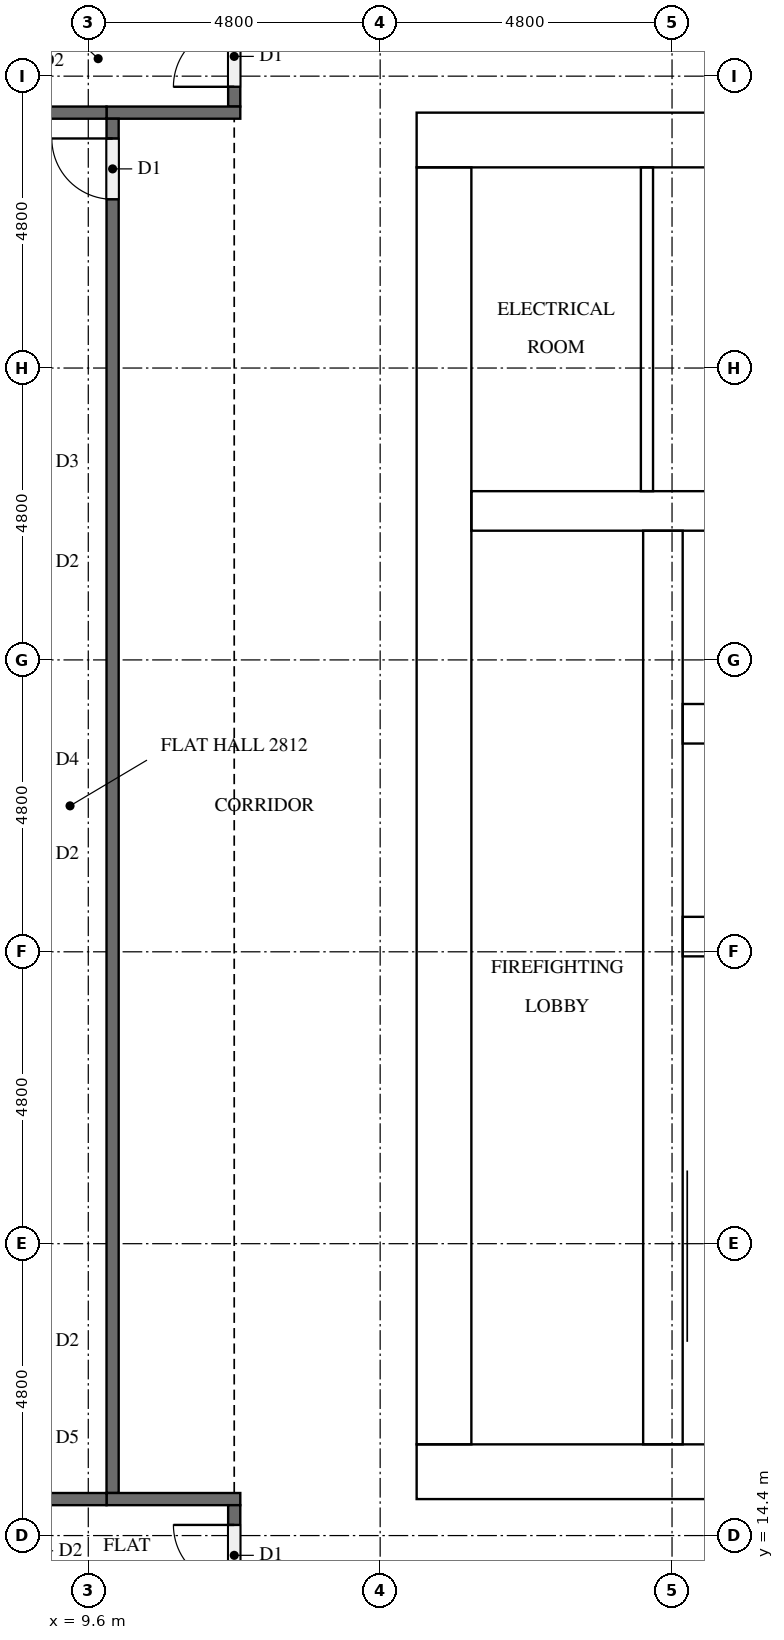
"""IFC4 building model, lengths in metres.
Left out: names, types, materials, properties, quantities, classifications, styles, units other than length and angle.
Written with IfcOpenShell. Run it as: python <this file> out.ifc"""

import sys

from ifc_helpers import new_model, si_unit, direction, frame, frame_2d, origin, place, context, subcontext, project, spatial, rectangle, extrude, element, fill, save


model = new_model("IFC4")
c1 = context("Model", 3, precision=1e-05, world=origin(), true_north=direction((0.0, 1.0)))
c2 = subcontext(c1, "Body", "Model", "MODEL_VIEW")
j1 = project(units=[si_unit("LENGTHUNIT", "METRE"), si_unit("PLANEANGLEUNIT", "RADIAN")], contexts=[c1])
p1 = place(None, origin())
s1 = spatial("IfcSite", under=j1, at=p1, CompositionType="ELEMENT")
p2 = place(p1, origin())
s2 = spatial("IfcBuilding", under=s1, at=p2, CompositionType="ELEMENT")
p3 = place(p2, frame((0.0, 0.0, 110.2)))
s3 = spatial("IfcBuildingStorey", under=s2, at=p3, CompositionType="ELEMENT", Elevation=110.2)
p4 = place(p3, frame((15.0, 15.45, 0.0), z_axis=(0.0, 0.0, 1.0), x_axis=(1.0, 0.0, 0.0)))
e1 = element("IfcWall", 1, at=p4, inside=s3, PredefinedType="SHEAR", context=c2, shape_type="SweptSolid", body=[
    extrude(rectangle(XDim=32.4, YDim=0.9, at=frame_2d((16.2, 0.0))), origin(), (0.0, 0.0, 1.0), 3.1),
])
p5 = place(p4, frame((15.3, 0.0, 0.0)))
e2 = element("IfcOpeningElement", 2, at=p5, cuts=e1, PredefinedType="OPENING", context=c2, shape_type="SweptSolid", body=[
    extrude(rectangle(XDim=1.8, YDim=2.1, at=frame_2d((0.9, 1.05))), frame((0.0, 0.46, 0.0), z_axis=(0.0, -1.0, 0.0), x_axis=(1.0, 0.0, 0.0)), (0.0, 0.0, 1.0), 0.92),
])
p6 = place(p3, frame((15.0, 37.35, 0.0), z_axis=(0.0, 0.0, 1.0), x_axis=(1.0, 0.0, 0.0)))
e3 = element("IfcWall", 3, at=p6, inside=s3, PredefinedType="SHEAR", context=c2, shape_type="SweptSolid", body=[
    extrude(rectangle(XDim=32.4, YDim=0.9, at=frame_2d((16.2, 0.0))), origin(), (0.0, 0.0, 1.0), 3.1),
])
p7 = place(p6, frame((15.3, 0.0, 0.0)))
e4 = element("IfcOpeningElement", 4, at=p7, cuts=e3, PredefinedType="OPENING", context=c2, shape_type="SweptSolid", body=[
    extrude(rectangle(XDim=1.8, YDim=2.1, at=frame_2d((0.9, 1.05))), frame((0.0, 0.46, 0.0), z_axis=(0.0, -1.0, 0.0), x_axis=(1.0, 0.0, 0.0)), (0.0, 0.0, 1.0), 0.92),
])
p8 = place(p6, frame((1.794, 0.0, 0.0)))
e5 = element("IfcOpeningElement", 5, at=p8, cuts=e3, PredefinedType="OPENING", context=c2, shape_type="SweptSolid", body=[
    extrude(rectangle(XDim=1.0, YDim=2.1, at=frame_2d((0.5, 1.05))), frame((0.0, 0.46, 0.0), z_axis=(0.0, -1.0, 0.0), x_axis=(1.0, 0.0, 0.0)), (0.0, 0.0, 1.0), 0.92),
])
p9 = place(p6, frame((5.331, 0.0, 0.0)))
e6 = element("IfcOpeningElement", 6, at=p9, cuts=e3, PredefinedType="OPENING", context=c2, shape_type="SweptSolid", body=[
    extrude(rectangle(XDim=1.0, YDim=2.1, at=frame_2d((0.5, 1.05))), frame((0.0, 0.46, 0.0), z_axis=(0.0, -1.0, 0.0), x_axis=(1.0, 0.0, 0.0)), (0.0, 0.0, 1.0), 0.92),
])
p10 = place(p3, frame((15.45, 15.9, 0.0), z_axis=(0.0, 0.0, 1.0), x_axis=(0.0, 1.0, 0.0)))
e7 = element("IfcWall", 7, at=p10, inside=s3, PredefinedType="SHEAR", context=c2, shape_type="SweptSolid", body=[
    extrude(rectangle(XDim=21.0, YDim=0.9, at=frame_2d((10.5, 0.0))), origin(), (0.0, 0.0, 1.0), 3.1),
])
p11 = place(p10, frame((4.86, 0.0, 0.0)))
e8 = element("IfcOpeningElement", 8, at=p11, cuts=e7, PredefinedType="OPENING", context=c2, shape_type="SweptSolid", body=[
    extrude(rectangle(XDim=1.2, YDim=2.1, at=frame_2d((0.6, 1.05))), frame((0.0, 0.46, 0.0), z_axis=(0.0, -1.0, 0.0), x_axis=(1.0, 0.0, 0.0)), (0.0, 0.0, 1.0), 0.92),
])
p12 = place(p3, frame((19.05, 15.9, 0.0), z_axis=(0.0, 0.0, 1.0), x_axis=(0.0, 1.0, 0.0)))
e9 = element("IfcWall", 9, at=p12, inside=s3, PredefinedType="SHEAR", context=c2, shape_type="SweptSolid", body=[
    extrude(rectangle(XDim=15.025, YDim=0.65, at=frame_2d((7.513, 0.0))), origin(), (0.0, 0.0, 1.0), 3.1),
])
p13 = place(p12, frame((9.55, 0.0, 0.0)))
e10 = element("IfcOpeningElement", 10, at=p13, cuts=e9, PredefinedType="OPENING", context=c2, shape_type="SweptSolid", body=[
    extrude(rectangle(XDim=1.1, YDim=2.1, at=frame_2d((0.55, 1.05))), frame((0.0, 0.335, 0.0), z_axis=(0.0, -1.0, 0.0), x_axis=(1.0, 0.0, 0.0)), (0.0, 0.0, 1.0), 0.67),
])
p14 = place(p12, frame((13.05, 0.0, 0.0)))
e11 = element("IfcOpeningElement", 11, at=p14, cuts=e9, PredefinedType="OPENING", context=c2, shape_type="SweptSolid", body=[
    extrude(rectangle(XDim=1.1, YDim=2.1, at=frame_2d((0.55, 1.05))), frame((0.0, 0.335, 0.0), z_axis=(0.0, -1.0, 0.0), x_axis=(1.0, 0.0, 0.0)), (0.0, 0.0, 1.0), 0.67),
])
p15 = place(p12, frame((0.3, 0.0, 0.0)))
e12 = element("IfcOpeningElement", 12, at=p15, cuts=e9, PredefinedType="OPENING", context=c2, shape_type="SweptSolid", body=[
    extrude(rectangle(XDim=1.2, YDim=2.1, at=frame_2d((0.6, 1.05))), frame((0.0, 0.335, 0.0), z_axis=(0.0, -1.0, 0.0), x_axis=(1.0, 0.0, 0.0)), (0.0, 0.0, 1.0), 0.67),
])
for number, where, z_axis, x_axis in (
    (13, (19.375, 24.25, 0.0), (0.0, 0.0, 1.0), (1.0, 0.0, 0.0)),
    (14, (19.375, 27.75, 0.0), (0.0, 0.0, 1.0), (1.0, 0.0, 0.0)),
):
    element("IfcWall", number, at=place(p3, frame(where, z_axis=z_axis, x_axis=x_axis)), inside=s3, PredefinedType="SHEAR", context=c2, shape_type="SweptSolid", body=[
        extrude(rectangle(XDim=3.4, YDim=0.65, at=frame_2d((1.7, 0.0))), origin(), (0.0, 0.0, 1.0), 3.1),
    ])
p16 = place(p3, frame((15.9, 31.25, 0.0), z_axis=(0.0, 0.0, 1.0), x_axis=(1.0, 0.0, 0.0)))
e15 = element("IfcWall", 15, at=p16, inside=s3, PredefinedType="SHEAR", context=c2, shape_type="SweptSolid", body=[
    extrude(rectangle(XDim=6.875, YDim=0.65, at=frame_2d((3.438, 0.0))), origin(), (0.0, 0.0, 1.0), 3.1),
])
p17 = place(p3, frame((18.788, 31.575, 0.0), z_axis=(0.0, 0.0, 1.0), x_axis=(0.0, 1.0, 0.0)))
e16 = element("IfcWall", 16, at=p17, inside=s3, PredefinedType="PARTITIONING", context=c2, shape_type="SweptSolid", body=[
    extrude(rectangle(XDim=5.325, YDim=0.2, at=frame_2d((2.663, 0.0))), origin(), (0.0, 0.0, 1.0), 3.1),
])
p18 = place(p3, frame((12.0, 37.9, 0.0), z_axis=(0.0, 0.0, 1.0), x_axis=(0.0, 1.0, 0.0)))
e17 = element("IfcWall", 17, at=p18, inside=s3, PredefinedType="PARTITIONING", context=c2, shape_type="SweptSolid", body=[
    extrude(rectangle(XDim=2.8, YDim=0.2, at=frame_2d((1.4, 0.0))), origin(), (0.0, 0.0, 1.0), 3.1),
])
p19 = place(p18, frame((0.325, 0.0, 0.0)))
e18 = element("IfcOpeningElement", 18, at=p19, cuts=e17, PredefinedType="OPENING", context=c2, shape_type="SweptSolid", body=[
    extrude(rectangle(XDim=1.0, YDim=2.1, at=frame_2d((0.5, 1.05))), frame((0.0, 0.11, 0.0), z_axis=(0.0, -1.0, 0.0), x_axis=(1.0, 0.0, 0.0)), (0.0, 0.0, 1.0), 0.22),
])
p20 = place(p3, frame((12.1, 37.8, 0.0), z_axis=(0.0, 0.0, 1.0), x_axis=(-1.0, 0.0, 0.0)))
e19 = element("IfcWall", 19, at=p20, inside=s3, PredefinedType="PARTITIONING", context=c2, shape_type="SweptSolid", body=[
    extrude(rectangle(XDim=2.2, YDim=0.2, at=frame_2d((1.1, 0.0))), origin(), (0.0, 0.0, 1.0), 3.1),
])
p21 = place(p3, frame((10.0, 15.1, 0.0), z_axis=(0.0, 0.0, 1.0), x_axis=(0.0, 1.0, 0.0)))
e20 = element("IfcWall", 20, at=p21, inside=s3, PredefinedType="PARTITIONING", context=c2, shape_type="SweptSolid", body=[
    extrude(rectangle(XDim=22.6, YDim=0.2, at=frame_2d((11.3, 0.0))), origin(), (0.0, 0.0, 1.0), 3.1),
])
p22 = place(p21, frame((21.275, 0.0, 0.0)))
e21 = element("IfcOpeningElement", 21, at=p22, cuts=e20, PredefinedType="OPENING", context=c2, shape_type="SweptSolid", body=[
    extrude(rectangle(XDim=1.0, YDim=2.1, at=frame_2d((0.5, 1.05))), frame((0.0, 0.11, 0.0), z_axis=(0.0, -1.0, 0.0), x_axis=(1.0, 0.0, 0.0)), (0.0, 0.0, 1.0), 0.22),
])
p23 = place(p3, frame((9.9, 15.0, 0.0), z_axis=(0.0, 0.0, 1.0), x_axis=(1.0, 0.0, 0.0)))
e22 = element("IfcWall", 22, at=p23, inside=s3, PredefinedType="PARTITIONING", context=c2, shape_type="SweptSolid", body=[
    extrude(rectangle(XDim=2.2, YDim=0.2, at=frame_2d((1.1, 0.0))), origin(), (0.0, 0.0, 1.0), 3.1),
])
p24 = place(p3, frame((12.0, 12.1, 0.0), z_axis=(0.0, 0.0, 1.0), x_axis=(0.0, 1.0, 0.0)))
e23 = element("IfcWall", 23, at=p24, inside=s3, PredefinedType="PARTITIONING", context=c2, shape_type="SweptSolid", body=[
    extrude(rectangle(XDim=2.8, YDim=0.2, at=frame_2d((1.4, 0.0))), origin(), (0.0, 0.0, 1.0), 3.1),
])
p25 = place(p24, frame((1.475, 0.0, 0.0)))
e24 = element("IfcOpeningElement", 24, at=p25, cuts=e23, PredefinedType="OPENING", context=c2, shape_type="SweptSolid", body=[
    extrude(rectangle(XDim=1.0, YDim=2.1, at=frame_2d((0.5, 1.05))), frame((0.0, 0.11, 0.0), z_axis=(0.0, -1.0, 0.0), x_axis=(1.0, 0.0, 0.0)), (0.0, 0.0, 1.0), 0.22),
])
p26 = place(p3, frame((5.225, 37.8, 0.0), z_axis=(0.0, 0.0, 1.0), x_axis=(1.0, 0.0, 0.0)))
e25 = element("IfcWall", 25, at=p26, inside=s3, PredefinedType="PARTITIONING", context=c2, shape_type="SweptSolid", body=[
    extrude(rectangle(XDim=4.675, YDim=0.2, at=frame_2d((2.337, 0.0))), origin(), (0.0, 0.0, 1.0), 3.1),
])
p27 = place(p3, frame((4.9, 15.0, 0.0), z_axis=(0.0, 0.0, 1.0), x_axis=(1.0, 0.0, 0.0)))
e26 = element("IfcWall", 26, at=p27, inside=s3, PredefinedType="PARTITIONING", context=c2, shape_type="SweptSolid", body=[
    extrude(rectangle(XDim=5.0, YDim=0.2, at=frame_2d((2.5, 0.0))), origin(), (0.0, 0.0, 1.0), 3.1),
])
p28 = place(p13, origin())
e27 = element("IfcDoor", 27, at=p28, inside=s3, OperationType="DOUBLE_DOOR_SLIDING", PredefinedType="DOOR", context=c2, shape_type="SweptSolid", body=[
    extrude(rectangle(XDim=1.1, YDim=2.1, at=frame_2d((0.55, 1.05))), frame((0.0, 0.025, 0.0), z_axis=(0.0, -1.0, 0.0), x_axis=(1.0, 0.0, 0.0)), (0.0, 0.0, 1.0), 0.05),
])
fill(e10, e27)
p29 = place(p14, origin())
e28 = element("IfcDoor", 28, at=p29, inside=s3, OperationType="DOUBLE_DOOR_SLIDING", PredefinedType="DOOR", context=c2, shape_type="SweptSolid", body=[
    extrude(rectangle(XDim=1.1, YDim=2.1, at=frame_2d((0.55, 1.05))), frame((0.0, 0.025, 0.0), z_axis=(0.0, -1.0, 0.0), x_axis=(1.0, 0.0, 0.0)), (0.0, 0.0, 1.0), 0.05),
])
fill(e11, e28)
p30 = place(p15, frame((1.2, 0.0, 0.0), z_axis=(0.0, 0.0, 1.0), x_axis=(-1.0, 0.0, 0.0)))
e29 = element("IfcDoor", 29, at=p30, inside=s3, OperationType="SINGLE_SWING_RIGHT", PredefinedType="DOOR", context=c2, shape_type="SweptSolid", body=[
    extrude(rectangle(XDim=1.2, YDim=2.1, at=frame_2d((0.6, 1.05))), frame((0.0, 0.025, 0.0), z_axis=(0.0, -1.0, 0.0), x_axis=(1.0, 0.0, 0.0)), (0.0, 0.0, 1.0), 0.05),
])
fill(e12, e29)
p31 = place(p11, frame((1.2, 0.0, 0.0), z_axis=(0.0, 0.0, 1.0), x_axis=(-1.0, 0.0, 0.0)))
e30 = element("IfcDoor", 30, at=p31, inside=s3, OperationType="SINGLE_SWING_LEFT", PredefinedType="DOOR", context=c2, shape_type="SweptSolid", body=[
    extrude(rectangle(XDim=1.2, YDim=2.1, at=frame_2d((0.6, 1.05))), frame((0.0, 0.025, 0.0), z_axis=(0.0, -1.0, 0.0), x_axis=(1.0, 0.0, 0.0)), (0.0, 0.0, 1.0), 0.05),
])
fill(e8, e30)
p32 = place(p8, origin())
e31 = element("IfcDoor", 31, at=p32, inside=s3, OperationType="SINGLE_SWING_LEFT", PredefinedType="DOOR", context=c2, shape_type="SweptSolid", body=[
    extrude(rectangle(XDim=1.0, YDim=2.1, at=frame_2d((0.5, 1.05))), frame((0.0, 0.025, 0.0), z_axis=(0.0, -1.0, 0.0), x_axis=(1.0, 0.0, 0.0)), (0.0, 0.0, 1.0), 0.05),
])
fill(e5, e31)
p33 = place(p19, origin())
e32 = element("IfcDoor", 32, at=p33, inside=s3, OperationType="SINGLE_SWING_LEFT", PredefinedType="DOOR", context=c2, shape_type="SweptSolid", body=[
    extrude(rectangle(XDim=1.0, YDim=2.1, at=frame_2d((0.5, 1.05))), frame((0.0, 0.025, 0.0), z_axis=(0.0, -1.0, 0.0), x_axis=(1.0, 0.0, 0.0)), (0.0, 0.0, 1.0), 0.05),
])
fill(e18, e32)
p34 = place(p22, origin())
e33 = element("IfcDoor", 33, at=p34, inside=s3, OperationType="SINGLE_SWING_RIGHT", PredefinedType="DOOR", context=c2, shape_type="SweptSolid", body=[
    extrude(rectangle(XDim=1.0, YDim=2.1, at=frame_2d((0.5, 1.05))), frame((0.0, 0.025, 0.0), z_axis=(0.0, -1.0, 0.0), x_axis=(1.0, 0.0, 0.0)), (0.0, 0.0, 1.0), 0.05),
])
fill(e21, e33)
p35 = place(p25, origin())
e34 = element("IfcDoor", 34, at=p35, inside=s3, OperationType="SINGLE_SWING_RIGHT", PredefinedType="DOOR", context=c2, shape_type="SweptSolid", body=[
    extrude(rectangle(XDim=1.0, YDim=2.1, at=frame_2d((0.5, 1.05))), frame((0.0, 0.025, 0.0), z_axis=(0.0, -1.0, 0.0), x_axis=(1.0, 0.0, 0.0)), (0.0, 0.0, 1.0), 0.05),
])
fill(e24, e34)
save(model, sys.argv[1])
